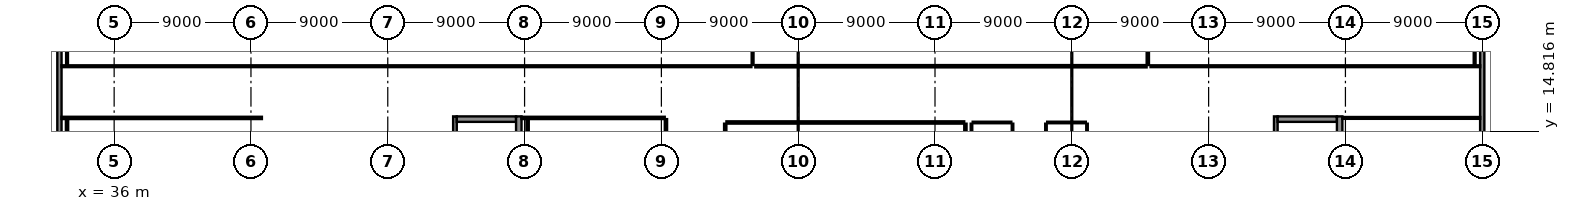
"""IFC4 building model, lengths in metres.
Left out: names, types, materials, properties, quantities, classifications, styles, units other than length and angle.
Written with IfcOpenShell. Run it as: python <this file> out.ifc"""

import sys

from ifc_helpers import new_model, si_unit, direction, frame, frame_2d, origin, place, context, subcontext, project, spatial, rectangle, extrude, element, fill, save


model = new_model("IFC4")
c1 = context("Model", 3, precision=1e-05, world=origin(), true_north=direction((0.0, 1.0)))
c2 = subcontext(c1, "Body", "Model", "MODEL_VIEW")
j1 = project(units=[si_unit("LENGTHUNIT", "METRE"), si_unit("PLANEANGLEUNIT", "RADIAN")], contexts=[c1])
p1 = place(None, origin())
s1 = spatial("IfcSite", under=j1, at=p1, CompositionType="ELEMENT")
p2 = place(p1, origin())
s2 = spatial("IfcBuilding", under=s1, at=p2, CompositionType="ELEMENT")
p3 = place(p2, frame((0.0, 0.0, 27.4)))
s3 = spatial("IfcBuildingStorey", under=s2, at=p3, CompositionType="ELEMENT", Elevation=27.4)
p4 = place(p3, frame((32.4, 23.96, 0.0), z_axis=(0.0, 0.0, 1.0), x_axis=(0.0, -1.0, 0.0)))
e1 = element("IfcWall", 1, at=p4, inside=s3, PredefinedType="SOLIDWALL", context=c2, shape_type="SweptSolid", body=[
    extrude(rectangle(XDim=11.97, YDim=0.28, at=frame_2d((5.985, 0.0))), origin(), (0.0, 0.0, 1.0), 3.095),
])
p5 = place(p4, frame((2.941, 0.0, 1.05)))
e2 = element("IfcOpeningElement", 2, at=p5, cuts=e1, PredefinedType="OPENING", context=c2, shape_type="SweptSolid", body=[
    extrude(rectangle(XDim=1.3, YDim=1.3, at=frame_2d((0.65, 0.65))), frame((0.0, 0.155, 0.0), z_axis=(0.0, -1.0, 0.0), x_axis=(1.0, 0.0, 0.0)), (0.0, 0.0, 1.0), 0.31),
])
p6 = place(p4, frame((8.5, 0.0, 1.05)))
e3 = element("IfcOpeningElement", 3, at=p6, cuts=e1, PredefinedType="OPENING", context=c2, shape_type="SweptSolid", body=[
    extrude(rectangle(XDim=1.3, YDim=1.3, at=frame_2d((0.65, 0.65))), frame((0.0, 0.155, 0.0), z_axis=(0.0, -1.0, 0.0), x_axis=(1.0, 0.0, 0.0)), (0.0, 0.0, 1.0), 0.31),
])
p7 = place(p3, frame((126.0, 12.138, 0.0), z_axis=(0.0, 0.0, 1.0), x_axis=(0.0, 1.0, 0.0)))
e4 = element("IfcWall", 4, at=p7, inside=s3, PredefinedType="SOLIDWALL", context=c2, shape_type="SweptSolid", body=[
    extrude(rectangle(XDim=11.589, YDim=0.28, at=frame_2d((5.794, 0.0))), origin(), (0.0, 0.0, 1.0), 3.305),
])
p8 = place(p7, frame((2.022, 0.0, 1.05)))
e5 = element("IfcOpeningElement", 5, at=p8, cuts=e4, PredefinedType="OPENING", context=c2, shape_type="SweptSolid", body=[
    extrude(rectangle(XDim=1.3, YDim=1.3, at=frame_2d((0.65, 0.65))), frame((0.0, 0.155, 0.0), z_axis=(0.0, -1.0, 0.0), x_axis=(1.0, 0.0, 0.0)), (0.0, 0.0, 1.0), 0.31),
])
p9 = place(p7, frame((7.462, 0.0, 1.05)))
e6 = element("IfcOpeningElement", 6, at=p9, cuts=e4, PredefinedType="OPENING", context=c2, shape_type="SweptSolid", body=[
    extrude(rectangle(XDim=1.3, YDim=1.3, at=frame_2d((0.65, 0.65))), frame((0.0, 0.155, 0.0), z_axis=(0.0, -1.0, 0.0), x_axis=(1.0, 0.0, 0.0)), (0.0, 0.0, 1.0), 0.31),
])
p10 = place(p3, frame((58.42, 13.04, 0.0), z_axis=(0.0, 0.0, 1.0), x_axis=(0.0, 1.0, 0.0)))
e7 = element("IfcWall", 7, at=p10, inside=s3, PredefinedType="SHEAR", context=c2, shape_type="SweptSolid", body=[
    extrude(rectangle(XDim=2.76, YDim=0.24, at=frame_2d((1.38, 0.0))), origin(), (0.0, 0.0, 1.0), 3.66),
])
p11 = place(p3, frame((58.54, 15.62, 0.0), z_axis=(0.0, 0.0, 1.0), x_axis=(1.0, 0.0, 0.0)))
e8 = element("IfcWall", 8, at=p11, inside=s3, PredefinedType="SHEAR", context=c2, shape_type="SweptSolid", body=[
    extrude(rectangle(XDim=3.9, YDim=0.36, at=frame_2d((1.95, 0.0))), origin(), (0.0, 0.0, 1.0), 3.66),
])
p12 = place(p11, frame((1.15, 0.0, 0.0)))
e9 = element("IfcOpeningElement", 9, at=p12, cuts=e8, PredefinedType="OPENING", context=c2, shape_type="SweptSolid", body=[
    extrude(rectangle(XDim=1.6, YDim=2.25, at=frame_2d((0.8, 1.125))), frame((0.0, 0.195, 0.0), z_axis=(0.0, -1.0, 0.0), x_axis=(1.0, 0.0, 0.0)), (0.0, 0.0, 1.0), 0.39),
])
p13 = place(p3, frame((62.62, 6.76, 0.0), z_axis=(0.0, 0.0, 1.0), x_axis=(0.0, 1.0, 0.0)))
e10 = element("IfcWall", 10, at=p13, inside=s3, PredefinedType="SHEAR", context=c2, shape_type="SweptSolid", body=[
    extrude(rectangle(XDim=9.04, YDim=0.36, at=frame_2d((4.52, 0.0))), origin(), (0.0, 0.0, 1.0), 3.66),
])
p14 = place(p3, frame((112.42, 13.04, 0.0), z_axis=(0.0, 0.0, 1.0), x_axis=(0.0, 1.0, 0.0)))
e11 = element("IfcWall", 11, at=p14, inside=s3, PredefinedType="SHEAR", context=c2, shape_type="SweptSolid", body=[
    extrude(rectangle(XDim=2.76, YDim=0.24, at=frame_2d((1.38, 0.0))), origin(), (0.0, 0.0, 1.0), 3.66),
])
p15 = place(p3, frame((112.54, 15.62, 0.0), z_axis=(0.0, 0.0, 1.0), x_axis=(1.0, 0.0, 0.0)))
e12 = element("IfcWall", 12, at=p15, inside=s3, PredefinedType="SHEAR", context=c2, shape_type="SweptSolid", body=[
    extrude(rectangle(XDim=3.9, YDim=0.36, at=frame_2d((1.95, 0.0))), origin(), (0.0, 0.0, 1.0), 3.66),
])
p16 = place(p15, frame((1.15, 0.0, 0.0)))
e13 = element("IfcOpeningElement", 13, at=p16, cuts=e12, PredefinedType="OPENING", context=c2, shape_type="SweptSolid", body=[
    extrude(rectangle(XDim=1.6, YDim=2.25, at=frame_2d((0.8, 1.125))), frame((0.0, 0.195, 0.0), z_axis=(0.0, -1.0, 0.0), x_axis=(1.0, 0.0, 0.0)), (0.0, 0.0, 1.0), 0.39),
])
p17 = place(p3, frame((116.62, 6.76, 0.0), z_axis=(0.0, 0.0, 1.0), x_axis=(0.0, 1.0, 0.0)))
e14 = element("IfcWall", 14, at=p17, inside=s3, PredefinedType="SHEAR", context=c2, shape_type="SweptSolid", body=[
    extrude(rectangle(XDim=9.04, YDim=0.36, at=frame_2d((4.52, 0.0))), origin(), (0.0, 0.0, 1.0), 3.66),
])
p18 = place(p3, frame((32.9, 0.47, 0.0), z_axis=(0.0, 0.0, 1.0), x_axis=(0.0, 1.0, 0.0)))
e15 = element("IfcWall", 15, at=p18, inside=s3, PredefinedType="PARTITIONING", context=c2, shape_type="SweptSolid", body=[
    extrude(rectangle(XDim=15.15, YDim=0.15, at=frame_2d((7.575, 0.0))), origin(), (0.0, 0.0, 1.0), 3.64),
])
p19 = place(p3, frame((32.535, 15.7, 0.0), z_axis=(0.0, 0.0, 1.0), x_axis=(1.0, 0.0, 0.0)))
e16 = element("IfcWall", 16, at=p19, inside=s3, PredefinedType="PARTITIONING", context=c2, shape_type="SweptSolid", body=[
    extrude(rectangle(XDim=13.185, YDim=0.15, at=frame_2d((6.593, 0.0))), origin(), (0.0, 0.0, 1.0), 3.64),
])
p20 = place(p19, frame((6.068, 0.0, 0.0)))
e17 = element("IfcOpeningElement", 17, at=p20, cuts=e16, PredefinedType="OPENING", context=c2, shape_type="SweptSolid", body=[
    extrude(rectangle(XDim=1.05, YDim=2.25, at=frame_2d((0.525, 1.125))), frame((0.0, 0.09, 0.0), z_axis=(0.0, -1.0, 0.0), x_axis=(1.0, 0.0, 0.0)), (0.0, 0.0, 1.0), 0.18),
])
p21 = place(p3, frame((63.2, 12.57, 0.0), z_axis=(0.0, 0.0, 1.0), x_axis=(0.0, 1.0, 0.0)))
e18 = element("IfcWall", 18, at=p21, inside=s3, PredefinedType="PARTITIONING", context=c2, shape_type="SweptSolid", body=[
    extrude(rectangle(XDim=3.05, YDim=0.15, at=frame_2d((1.525, 0.0))), origin(), (0.0, 0.0, 1.0), 3.355),
])
p22 = place(p3, frame((62.795, 15.7, 0.0), z_axis=(0.0, 0.0, 1.0), x_axis=(1.0, 0.0, 0.0)))
e19 = element("IfcWall", 19, at=p22, inside=s3, PredefinedType="PARTITIONING", context=c2, shape_type="SweptSolid", body=[
    extrude(rectangle(XDim=9.425, YDim=0.15, at=frame_2d((4.712, 0.0))), origin(), (0.0, 0.0, 1.0), 3.64),
])
p23 = place(p22, frame((4.187, 0.0, 0.0)))
e20 = element("IfcOpeningElement", 20, at=p23, cuts=e19, PredefinedType="OPENING", context=c2, shape_type="SweptSolid", body=[
    extrude(rectangle(XDim=1.05, YDim=2.25, at=frame_2d((0.525, 1.125))), frame((0.0, 0.09, 0.0), z_axis=(0.0, -1.0, 0.0), x_axis=(1.0, 0.0, 0.0)), (0.0, 0.0, 1.0), 0.18),
])
p24 = place(p3, frame((72.3, 15.62, 0.0), z_axis=(0.0, 0.0, 1.0), x_axis=(0.0, -1.0, 0.0)))
e21 = element("IfcWall", 21, at=p24, inside=s3, PredefinedType="PARTITIONING", context=c2, shape_type="SweptSolid", body=[
    extrude(rectangle(XDim=3.04, YDim=0.15, at=frame_2d((1.52, 0.0))), origin(), (0.0, 0.0, 1.0), 3.64),
])
p25 = place(p3, frame((77.92, 19.1, 0.0), z_axis=(0.0, 0.0, 1.0), x_axis=(-1.0, 0.0, 0.0)))
e22 = element("IfcWall", 22, at=p25, inside=s3, PredefinedType="PARTITIONING", context=c2, shape_type="SweptSolid", body=[
    extrude(rectangle(XDim=45.385, YDim=0.12, at=frame_2d((22.692, 0.0))), origin(), (0.0, 0.0, 1.0), 3.64),
])
p26 = place(p25, frame((22.218, 0.0, 0.0)))
e23 = element("IfcOpeningElement", 23, at=p26, cuts=e22, PredefinedType="OPENING", context=c2, shape_type="SweptSolid", body=[
    extrude(rectangle(XDim=0.95, YDim=2.15, at=frame_2d((0.475, 1.075))), frame((0.0, 0.075, 0.0), z_axis=(0.0, -1.0, 0.0), x_axis=(1.0, 0.0, 0.0)), (0.0, 0.0, 1.0), 0.15),
])
p27 = place(p3, frame((32.9, 19.155, 0.0), z_axis=(0.0, 0.0, 1.0), x_axis=(0.0, 1.0, 0.0)))
e24 = element("IfcWall", 24, at=p27, inside=s3, PredefinedType="PARTITIONING", context=c2, shape_type="SweptSolid", body=[
    extrude(rectangle(XDim=4.71, YDim=0.12, at=frame_2d((2.355, 0.0))), origin(), (0.0, 0.0, 1.0), 3.64),
])
p28 = place(p3, frame((78.0, 23.865, 0.0), z_axis=(0.0, 0.0, 1.0), x_axis=(0.0, -1.0, 0.0)))
e25 = element("IfcWall", 25, at=p28, inside=s3, PredefinedType="PARTITIONING", context=c2, shape_type="SweptSolid", body=[
    extrude(rectangle(XDim=4.685, YDim=0.12, at=frame_2d((2.343, 0.0))), origin(), (0.0, 0.0, 1.0), 3.64),
])
p29 = place(p3, frame((104.0, 23.865, 0.0), z_axis=(0.0, 0.0, 1.0), x_axis=(0.0, -1.0, 0.0)))
e26 = element("IfcWall", 26, at=p29, inside=s3, PredefinedType="PARTITIONING", context=c2, shape_type="SweptSolid", body=[
    extrude(rectangle(XDim=4.685, YDim=0.15, at=frame_2d((2.343, 0.0))), origin(), (0.0, 0.0, 1.0), 3.64),
])
p30 = place(p3, frame((103.92, 19.1, 0.0), z_axis=(0.0, 0.0, 1.0), x_axis=(-1.0, 0.0, 0.0)))
e27 = element("IfcWall", 27, at=p30, inside=s3, PredefinedType="PARTITIONING", context=c2, shape_type="SweptSolid", body=[
    extrude(rectangle(XDim=25.74, YDim=0.15, at=frame_2d((12.87, 0.0))), origin(), (0.0, 0.0, 1.0), 3.64),
])
p31 = place(p30, frame((12.345, 0.0, 0.0)))
e28 = element("IfcOpeningElement", 28, at=p31, cuts=e27, PredefinedType="OPENING", context=c2, shape_type="SweptSolid", body=[
    extrude(rectangle(XDim=1.05, YDim=2.25, at=frame_2d((0.525, 1.125))), frame((0.0, 0.09, 0.0), z_axis=(0.0, -1.0, 0.0), x_axis=(1.0, 0.0, 0.0)), (0.0, 0.0, 1.0), 0.18),
])
p32 = place(p3, frame((125.5, 23.865, 0.0), z_axis=(0.0, 0.0, 1.0), x_axis=(0.0, -1.0, 0.0)))
e29 = element("IfcWall", 29, at=p32, inside=s3, PredefinedType="PARTITIONING", context=c2, shape_type="SweptSolid", body=[
    extrude(rectangle(XDim=4.685, YDim=0.12, at=frame_2d((2.343, 0.0))), origin(), (0.0, 0.0, 1.0), 3.64),
])
p33 = place(p3, frame((125.865, 19.1, 0.0), z_axis=(0.0, 0.0, 1.0), x_axis=(-1.0, 0.0, 0.0)))
e30 = element("IfcWall", 30, at=p33, inside=s3, PredefinedType="PARTITIONING", context=c2, shape_type="SweptSolid", body=[
    extrude(rectangle(XDim=21.685, YDim=0.12, at=frame_2d((10.843, 0.0))), origin(), (0.0, 0.0, 1.0), 3.64),
])
p34 = place(p33, frame((10.392, 0.0, 0.0)))
e31 = element("IfcOpeningElement", 31, at=p34, cuts=e30, PredefinedType="OPENING", context=c2, shape_type="SweptSolid", body=[
    extrude(rectangle(XDim=0.9, YDim=2.1, at=frame_2d((0.45, 1.05))), frame((0.0, 0.075, 0.0), z_axis=(0.0, -1.0, 0.0), x_axis=(1.0, 0.0, 0.0)), (0.0, 0.0, 1.0), 0.15),
])
p35 = place(p3, frame((116.795, 15.7, 0.0), z_axis=(0.0, 0.0, 1.0), x_axis=(1.0, 0.0, 0.0)))
e32 = element("IfcWall", 32, at=p35, inside=s3, PredefinedType="PARTITIONING", context=c2, shape_type="SweptSolid", body=[
    extrude(rectangle(XDim=9.07, YDim=0.12, at=frame_2d((4.535, 0.0))), origin(), (0.0, 0.0, 1.0), 3.64),
])
p36 = place(p35, frame((4.06, 0.0, 0.0)))
e33 = element("IfcOpeningElement", 33, at=p36, cuts=e32, PredefinedType="OPENING", context=c2, shape_type="SweptSolid", body=[
    extrude(rectangle(XDim=0.95, YDim=2.15, at=frame_2d((0.475, 1.075))), frame((0.0, 0.075, 0.0), z_axis=(0.0, -1.0, 0.0), x_axis=(1.0, 0.0, 0.0)), (0.0, 0.0, 1.0), 0.15),
])
p37 = place(p3, frame((76.2, 3.67, 0.0), z_axis=(0.0, 0.0, 1.0), x_axis=(0.0, 1.0, 0.0)))
e34 = element("IfcWall", 34, at=p37, inside=s3, PredefinedType="PARTITIONING", context=c2, shape_type="SweptSolid", body=[
    extrude(rectangle(XDim=11.65, YDim=0.15, at=frame_2d((5.825, 0.0))), origin(), (0.0, 0.0, 1.0), 3.64),
])
p38 = place(p3, frame((76.28, 15.4, 0.0), z_axis=(0.0, 0.0, 1.0), x_axis=(1.0, 0.0, 0.0)))
e35 = element("IfcWall", 35, at=p38, inside=s3, PredefinedType="PARTITIONING", context=c2, shape_type="SweptSolid", body=[
    extrude(rectangle(XDim=15.64, YDim=0.15, at=frame_2d((7.82, 0.0))), origin(), (0.0, 0.0, 1.0), 3.64),
])
p39 = place(p38, frame((7.295, 0.0, 0.0)))
e36 = element("IfcOpeningElement", 36, at=p39, cuts=e35, PredefinedType="OPENING", context=c2, shape_type="SweptSolid", body=[
    extrude(rectangle(XDim=1.05, YDim=2.25, at=frame_2d((0.525, 1.125))), frame((0.0, 0.09, 0.0), z_axis=(0.0, -1.0, 0.0), x_axis=(1.0, 0.0, 0.0)), (0.0, 0.0, 1.0), 0.18),
])
p40 = place(p3, frame((92.0, 15.32, 0.0), z_axis=(0.0, 0.0, 1.0), x_axis=(0.0, -1.0, 0.0)))
e37 = element("IfcWall", 37, at=p40, inside=s3, PredefinedType="PARTITIONING", context=c2, shape_type="SweptSolid", body=[
    extrude(rectangle(XDim=11.65, YDim=0.15, at=frame_2d((5.825, 0.0))), origin(), (0.0, 0.0, 1.0), 3.64),
])
p41 = place(p3, frame((92.4, 9.845, 0.0), z_axis=(0.0, 0.0, 1.0), x_axis=(0.0, 1.0, 0.0)))
e38 = element("IfcWall", 38, at=p41, inside=s3, PredefinedType="PARTITIONING", context=c2, shape_type="SweptSolid", body=[
    extrude(rectangle(XDim=5.475, YDim=0.1, at=frame_2d((2.738, 0.0))), origin(), (0.0, 0.0, 1.0), 3.64),
])
p42 = place(p3, frame((92.48, 15.4, 0.0), z_axis=(0.0, 0.0, 1.0), x_axis=(1.0, 0.0, 0.0)))
e39 = element("IfcWall", 39, at=p42, inside=s3, PredefinedType="PARTITIONING", context=c2, shape_type="SweptSolid", body=[
    extrude(rectangle(XDim=2.54, YDim=0.1, at=frame_2d((1.27, 0.0))), origin(), (0.0, 0.0, 1.0), 3.64),
])
p43 = place(p3, frame((95.1, 15.32, 0.0), z_axis=(0.0, 0.0, 1.0), x_axis=(0.0, -1.0, 0.0)))
e40 = element("IfcWall", 40, at=p43, inside=s3, PredefinedType="PARTITIONING", context=c2, shape_type="SweptSolid", body=[
    extrude(rectangle(XDim=5.34, YDim=0.1, at=frame_2d((2.67, 0.0))), origin(), (0.0, 0.0, 1.0), 3.64),
])
p44 = place(p43, frame((2.22, 0.0, 0.0)))
e41 = element("IfcOpeningElement", 41, at=p44, cuts=e40, PredefinedType="OPENING", context=c2, shape_type="SweptSolid", body=[
    extrude(rectangle(XDim=0.9, YDim=2.05, at=frame_2d((0.45, 1.025))), frame((0.0, 0.065, 0.0), z_axis=(0.0, -1.0, 0.0), x_axis=(1.0, 0.0, 0.0)), (0.0, 0.0, 1.0), 0.13),
])
p45 = place(p3, frame((97.3, 9.88, 0.0), z_axis=(0.0, 0.0, 1.0), x_axis=(0.0, 1.0, 0.0)))
e42 = element("IfcWall", 42, at=p45, inside=s3, PredefinedType="PARTITIONING", context=c2, shape_type="SweptSolid", body=[
    extrude(rectangle(XDim=5.44, YDim=0.1, at=frame_2d((2.72, 0.0))), origin(), (0.0, 0.0, 1.0), 3.64),
])
p46 = place(p45, frame((2.22, 0.0, 0.0)))
e43 = element("IfcOpeningElement", 43, at=p46, cuts=e42, PredefinedType="OPENING", context=c2, shape_type="SweptSolid", body=[
    extrude(rectangle(XDim=1.0, YDim=2.1, at=frame_2d((0.5, 1.05))), frame((0.0, 0.065, 0.0), z_axis=(0.0, -1.0, 0.0), x_axis=(1.0, 0.0, 0.0)), (0.0, 0.0, 1.0), 0.13),
])
p47 = place(p3, frame((97.38, 15.4, 0.0), z_axis=(0.0, 0.0, 1.0), x_axis=(1.0, 0.0, 0.0)))
e44 = element("IfcWall", 44, at=p47, inside=s3, PredefinedType="PARTITIONING", context=c2, shape_type="SweptSolid", body=[
    extrude(rectangle(XDim=2.54, YDim=0.1, at=frame_2d((1.27, 0.0))), origin(), (0.0, 0.0, 1.0), 3.64),
])
p48 = place(p3, frame((100.0, 15.32, 0.0), z_axis=(0.0, 0.0, 1.0), x_axis=(0.0, -1.0, 0.0)))
e45 = element("IfcWall", 45, at=p48, inside=s3, PredefinedType="PARTITIONING", context=c2, shape_type="SweptSolid", body=[
    extrude(rectangle(XDim=5.44, YDim=0.1, at=frame_2d((2.72, 0.0))), origin(), (0.0, 0.0, 1.0), 3.64),
])
p49 = place(p5, origin())
e46 = element("IfcWindow", 46, at=p49, inside=s3, PartitioningType="SINGLE_PANEL", PredefinedType="WINDOW", context=c2, shape_type="SweptSolid", body=[
    extrude(rectangle(XDim=1.3, YDim=1.3, at=frame_2d((0.65, 0.65))), frame((0.0, 0.03, 0.0), z_axis=(0.0, -1.0, 0.0), x_axis=(1.0, 0.0, 0.0)), (0.0, 0.0, 1.0), 0.06),
])
fill(e2, e46)
p50 = place(p6, origin())
e47 = element("IfcWindow", 47, at=p50, inside=s3, PartitioningType="SINGLE_PANEL", PredefinedType="WINDOW", context=c2, shape_type="SweptSolid", body=[
    extrude(rectangle(XDim=1.3, YDim=1.3, at=frame_2d((0.65, 0.65))), frame((0.0, 0.03, 0.0), z_axis=(0.0, -1.0, 0.0), x_axis=(1.0, 0.0, 0.0)), (0.0, 0.0, 1.0), 0.06),
])
fill(e3, e47)
p51 = place(p8, origin())
e48 = element("IfcWindow", 48, at=p51, inside=s3, PartitioningType="SINGLE_PANEL", PredefinedType="WINDOW", context=c2, shape_type="SweptSolid", body=[
    extrude(rectangle(XDim=1.3, YDim=1.3, at=frame_2d((0.65, 0.65))), frame((0.0, 0.03, 0.0), z_axis=(0.0, -1.0, 0.0), x_axis=(1.0, 0.0, 0.0)), (0.0, 0.0, 1.0), 0.06),
])
fill(e5, e48)
p52 = place(p9, origin())
e49 = element("IfcWindow", 49, at=p52, inside=s3, PartitioningType="SINGLE_PANEL", PredefinedType="WINDOW", context=c2, shape_type="SweptSolid", body=[
    extrude(rectangle(XDim=1.3, YDim=1.3, at=frame_2d((0.65, 0.65))), frame((0.0, 0.03, 0.0), z_axis=(0.0, -1.0, 0.0), x_axis=(1.0, 0.0, 0.0)), (0.0, 0.0, 1.0), 0.06),
])
fill(e6, e49)
p53 = place(p12, origin())
e50 = element("IfcDoor", 50, at=p53, inside=s3, OperationType="DOUBLE_DOOR_SINGLE_SWING", PredefinedType="DOOR", context=c2, shape_type="SweptSolid", body=[
    extrude(rectangle(XDim=1.6, YDim=2.25, at=frame_2d((0.8, 1.125))), frame((0.0, 0.025, 0.0), z_axis=(0.0, -1.0, 0.0), x_axis=(1.0, 0.0, 0.0)), (0.0, 0.0, 1.0), 0.05),
])
fill(e9, e50)
p54 = place(p16, origin())
e51 = element("IfcDoor", 51, at=p54, inside=s3, OperationType="DOUBLE_DOOR_SINGLE_SWING", PredefinedType="DOOR", context=c2, shape_type="SweptSolid", body=[
    extrude(rectangle(XDim=1.6, YDim=2.25, at=frame_2d((0.8, 1.125))), frame((0.0, 0.025, 0.0), z_axis=(0.0, -1.0, 0.0), x_axis=(1.0, 0.0, 0.0)), (0.0, 0.0, 1.0), 0.05),
])
fill(e13, e51)
p55 = place(p20, origin())
e52 = element("IfcDoor", 52, at=p55, inside=s3, OperationType="SINGLE_SWING_RIGHT", PredefinedType="DOOR", context=c2, shape_type="SweptSolid", body=[
    extrude(rectangle(XDim=1.05, YDim=2.25, at=frame_2d((0.525, 1.125))), frame((0.0, 0.025, 0.0), z_axis=(0.0, -1.0, 0.0), x_axis=(1.0, 0.0, 0.0)), (0.0, 0.0, 1.0), 0.05),
])
fill(e17, e52)
p56 = place(p23, origin())
e53 = element("IfcDoor", 53, at=p56, inside=s3, OperationType="SINGLE_SWING_LEFT", PredefinedType="DOOR", context=c2, shape_type="SweptSolid", body=[
    extrude(rectangle(XDim=1.05, YDim=2.25, at=frame_2d((0.525, 1.125))), frame((0.0, 0.025, 0.0), z_axis=(0.0, -1.0, 0.0), x_axis=(1.0, 0.0, 0.0)), (0.0, 0.0, 1.0), 0.05),
])
fill(e20, e53)
p57 = place(p26, frame((0.95, 0.0, 0.0), z_axis=(0.0, 0.0, 1.0), x_axis=(-1.0, 0.0, 0.0)))
e54 = element("IfcDoor", 54, at=p57, inside=s3, OperationType="SINGLE_SWING_RIGHT", PredefinedType="DOOR", context=c2, shape_type="SweptSolid", body=[
    extrude(rectangle(XDim=0.95, YDim=2.15, at=frame_2d((0.475, 1.075))), frame((0.0, 0.025, 0.0), z_axis=(0.0, -1.0, 0.0), x_axis=(1.0, 0.0, 0.0)), (0.0, 0.0, 1.0), 0.05),
])
fill(e23, e54)
p58 = place(p31, origin())
e55 = element("IfcDoor", 55, at=p58, inside=s3, OperationType="SINGLE_SWING_LEFT", PredefinedType="DOOR", context=c2, shape_type="SweptSolid", body=[
    extrude(rectangle(XDim=1.05, YDim=2.25, at=frame_2d((0.525, 1.125))), frame((0.0, 0.025, 0.0), z_axis=(0.0, -1.0, 0.0), x_axis=(1.0, 0.0, 0.0)), (0.0, 0.0, 1.0), 0.05),
])
fill(e28, e55)
p59 = place(p34, frame((0.9, 0.0, 0.0), z_axis=(0.0, 0.0, 1.0), x_axis=(-1.0, 0.0, 0.0)))
e56 = element("IfcDoor", 56, at=p59, inside=s3, OperationType="SINGLE_SWING_RIGHT", PredefinedType="DOOR", context=c2, shape_type="SweptSolid", body=[
    extrude(rectangle(XDim=0.9, YDim=2.1, at=frame_2d((0.45, 1.05))), frame((0.0, 0.025, 0.0), z_axis=(0.0, -1.0, 0.0), x_axis=(1.0, 0.0, 0.0)), (0.0, 0.0, 1.0), 0.05),
])
fill(e31, e56)
p60 = place(p36, frame((0.95, 0.0, 0.0), z_axis=(0.0, 0.0, 1.0), x_axis=(-1.0, 0.0, 0.0)))
e57 = element("IfcDoor", 57, at=p60, inside=s3, OperationType="SINGLE_SWING_RIGHT", PredefinedType="DOOR", context=c2, shape_type="SweptSolid", body=[
    extrude(rectangle(XDim=0.95, YDim=2.15, at=frame_2d((0.475, 1.075))), frame((0.0, 0.025, 0.0), z_axis=(0.0, -1.0, 0.0), x_axis=(1.0, 0.0, 0.0)), (0.0, 0.0, 1.0), 0.05),
])
fill(e33, e57)
p61 = place(p39, origin())
e58 = element("IfcDoor", 58, at=p61, inside=s3, OperationType="SINGLE_SWING_LEFT", PredefinedType="DOOR", context=c2, shape_type="SweptSolid", body=[
    extrude(rectangle(XDim=1.05, YDim=2.25, at=frame_2d((0.525, 1.125))), frame((0.0, 0.025, 0.0), z_axis=(0.0, -1.0, 0.0), x_axis=(1.0, 0.0, 0.0)), (0.0, 0.0, 1.0), 0.05),
])
fill(e36, e58)
save(model, sys.argv[1])
